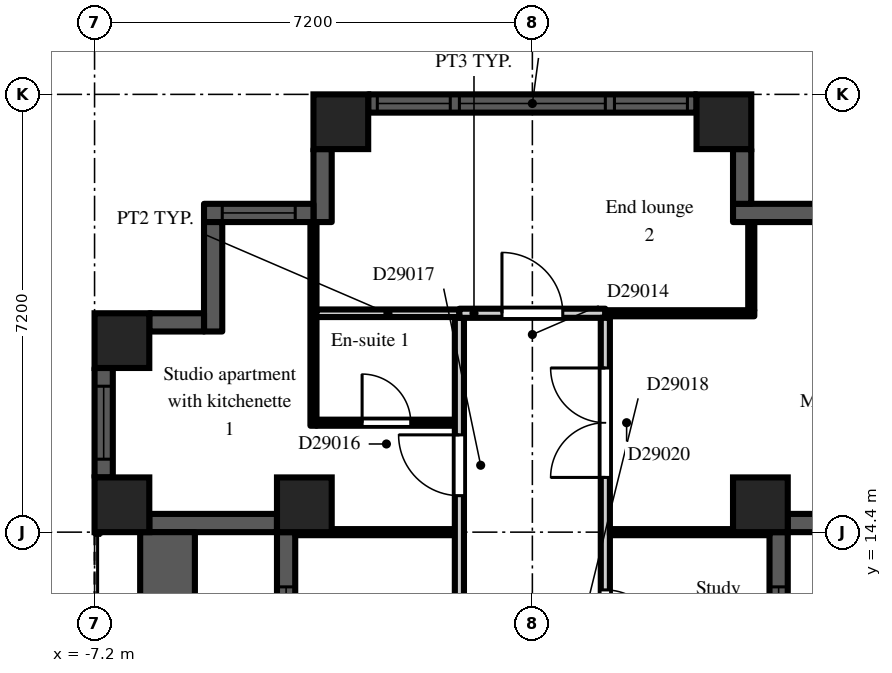
"""IFC4 building model, lengths in metres.
Left out: names, types, materials, properties, quantities, classifications, styles, units other than length and angle.
Written with IfcOpenShell. Run it as: python <this file> out.ifc"""

import sys

from ifc_helpers import new_model, si_unit, direction, frame, frame_2d, origin, origin_2d, place, context, subcontext, project, spatial, rectangle, extrude, element, fill, save


model = new_model("IFC4")
c1 = context("Model", 3, precision=1e-05, world=origin(), true_north=direction((0.0, 1.0)))
c2 = subcontext(c1, "Body", "Model", "MODEL_VIEW")
j1 = project(units=[si_unit("LENGTHUNIT", "METRE"), si_unit("PLANEANGLEUNIT", "RADIAN")], contexts=[c1])
p1 = place(None, origin())
s1 = spatial("IfcSite", under=j1, at=p1, CompositionType="ELEMENT")
p2 = place(p1, origin())
s2 = spatial("IfcBuilding", under=s1, at=p2, CompositionType="ELEMENT")
p3 = place(p2, frame((0.0, 0.0, 198.9)))
s3 = spatial("IfcBuildingStorey", under=s2, at=p3, CompositionType="ELEMENT", Elevation=198.9)
for number, where, z_axis, x_axis in (
    (1, (-6.75, 14.85, 0.0), (0.0, 0.0, 1.0), (1.0, 0.0, 0.0)),
    (2, (-6.75, 17.55, 0.0), (0.0, 0.0, 1.0), (1.0, 0.0, 0.0)),
    (3, (-3.75, 14.85, 0.0), (0.0, 0.0, 1.0), (1.0, 0.0, 0.0)),
    (4, (-3.15, 21.15, 0.0), (0.0, 0.0, 1.0), (1.0, 0.0, 0.0)),
    (5, (3.15, 21.15, 0.0), (0.0, 0.0, 1.0), (1.0, 0.0, 0.0)),
    (6, (3.75, 14.85, 0.0), (0.0, 0.0, 1.0), (1.0, 0.0, 0.0)),
):
    element("IfcColumn", number, at=place(p3, frame(where, z_axis=z_axis, x_axis=x_axis)), inside=s3, PredefinedType="COLUMN", context=c2, shape_type="SweptSolid", body=[
        extrude(rectangle(XDim=0.9, YDim=0.9, at=origin_2d()), origin(), (0.0, 0.0, 1.0), 3.0),
    ])
p4 = place(p3, frame((4.05, 7.2, 0.0), z_axis=(0.0, 0.0, 1.0), x_axis=(0.0, 1.0, 0.0)))
e7 = element("IfcWall", 7, at=p4, inside=s3, PredefinedType="SOLIDWALL", context=c2, shape_type="SweptSolid", body=[
    extrude(rectangle(XDim=7.2, YDim=0.3, at=frame_2d((3.6, 0.0))), origin(), (0.0, 0.0, 1.0), 2.3),
])
p5 = place(p4, frame((3.0, 0.0, 0.0)))
e8 = element("IfcOpeningElement", 8, at=p5, cuts=e7, PredefinedType="OPENING", context=c2, shape_type="SweptSolid", body=[
    extrude(rectangle(XDim=1.2, YDim=2.05, at=frame_2d((0.6, 1.025))), frame((0.0, 0.16, 0.0), z_axis=(0.0, -1.0, 0.0), x_axis=(1.0, 0.0, 0.0)), (0.0, 0.0, 1.0), 0.32),
])
p6 = place(p4, frame((0.9, 0.0, 0.2)))
e9 = element("IfcOpeningElement", 9, at=p6, cuts=e7, PredefinedType="OPENING", context=c2, shape_type="SweptSolid", body=[
    extrude(rectangle(XDim=1.8, YDim=1.85, at=frame_2d((0.9, 0.925))), frame((0.0, 0.16, 0.0), z_axis=(0.0, -1.0, 0.0), x_axis=(1.0, 0.0, 0.0)), (0.0, 0.0, 1.0), 0.32),
])
p7 = place(p4, frame((4.5, 0.0, 0.2)))
e10 = element("IfcOpeningElement", 10, at=p7, cuts=e7, PredefinedType="OPENING", context=c2, shape_type="SweptSolid", body=[
    extrude(rectangle(XDim=1.8, YDim=1.85, at=frame_2d((0.9, 0.925))), frame((0.0, 0.16, 0.0), z_axis=(0.0, -1.0, 0.0), x_axis=(1.0, 0.0, 0.0)), (0.0, 0.0, 1.0), 0.32),
])
p8 = place(p3, frame((4.2, 14.55, 0.0), z_axis=(0.0, 0.0, 1.0), x_axis=(1.0, 0.0, 0.0)))
e11 = element("IfcWall", 11, at=p8, inside=s3, PredefinedType="SOLIDWALL", context=c2, shape_type="SweptSolid", body=[
    extrude(rectangle(XDim=2.1, YDim=0.3, at=frame_2d((1.05, 0.0))), origin(), (0.0, 0.0, 1.0), 2.3),
])
p9 = place(p3, frame((5.1, 19.65, 0.0), z_axis=(0.0, 0.0, 1.0), x_axis=(-1.0, 0.0, 0.0)))
e12 = element("IfcWall", 12, at=p9, inside=s3, PredefinedType="SOLIDWALL", context=c2, shape_type="SweptSolid", body=[
    extrude(rectangle(XDim=1.8, YDim=0.3, at=frame_2d((0.9, 0.0))), origin(), (0.0, 0.0, 1.0), 2.6),
])
p10 = place(p3, frame((3.45, 19.8, 0.0), z_axis=(0.0, 0.0, 1.0), x_axis=(0.0, 1.0, 0.0)))
e13 = element("IfcWall", 13, at=p10, inside=s3, PredefinedType="SOLIDWALL", context=c2, shape_type="SweptSolid", body=[
    extrude(rectangle(XDim=0.9, YDim=0.3, at=frame_2d((0.45, 0.0))), origin(), (0.0, 0.0, 1.0), 2.6),
])
p11 = place(p3, frame((2.7, 21.45, 0.0), z_axis=(0.0, 0.0, 1.0), x_axis=(-1.0, 0.0, 0.0)))
e14 = element("IfcWall", 14, at=p11, inside=s3, PredefinedType="SOLIDWALL", context=c2, shape_type="SweptSolid", body=[
    extrude(rectangle(XDim=5.4, YDim=0.3, at=frame_2d((2.7, 0.0))), origin(), (0.0, 0.0, 1.0), 2.3),
])
p12 = place(p11, frame((1.5, 0.0, 0.2)))
e15 = element("IfcOpeningElement", 15, at=p12, cuts=e14, PredefinedType="OPENING", context=c2, shape_type="SweptSolid", body=[
    extrude(rectangle(XDim=2.4, YDim=1.85, at=frame_2d((1.2, 0.925))), frame((0.0, 0.16, 0.0), z_axis=(0.0, -1.0, 0.0), x_axis=(1.0, 0.0, 0.0)), (0.0, 0.0, 1.0), 0.32),
])
p13 = place(p11, frame((0.15, 0.0, 0.2)))
e16 = element("IfcOpeningElement", 16, at=p13, cuts=e14, PredefinedType="OPENING", context=c2, shape_type="SweptSolid", body=[
    extrude(rectangle(XDim=1.2, YDim=1.85, at=frame_2d((0.6, 0.925))), frame((0.0, 0.16, 0.0), z_axis=(0.0, -1.0, 0.0), x_axis=(1.0, 0.0, 0.0)), (0.0, 0.0, 1.0), 0.32),
])
p14 = place(p11, frame((4.05, 0.0, 0.2)))
e17 = element("IfcOpeningElement", 17, at=p14, cuts=e14, PredefinedType="OPENING", context=c2, shape_type="SweptSolid", body=[
    extrude(rectangle(XDim=1.2, YDim=1.85, at=frame_2d((0.6, 0.925))), frame((0.0, 0.16, 0.0), z_axis=(0.0, -1.0, 0.0), x_axis=(1.0, 0.0, 0.0)), (0.0, 0.0, 1.0), 0.32),
])
p15 = place(p3, frame((-3.45, 20.7, 0.0), z_axis=(0.0, 0.0, 1.0), x_axis=(0.0, -1.0, 0.0)))
e18 = element("IfcWall", 18, at=p15, inside=s3, PredefinedType="SOLIDWALL", context=c2, shape_type="SweptSolid", body=[
    extrude(rectangle(XDim=1.2, YDim=0.3, at=frame_2d((0.6, 0.0))), origin(), (0.0, 0.0, 1.0), 2.6),
])
p16 = place(p3, frame((-3.6, 19.65, 0.0), z_axis=(0.0, 0.0, 1.0), x_axis=(-1.0, 0.0, 0.0)))
e19 = element("IfcWall", 19, at=p16, inside=s3, PredefinedType="SOLIDWALL", context=c2, shape_type="SweptSolid", body=[
    extrude(rectangle(XDim=1.8, YDim=0.3, at=frame_2d((0.9, 0.0))), origin(), (0.0, 0.0, 1.0), 2.6),
])
p17 = place(p16, frame((0.3, 0.0, 0.2)))
e20 = element("IfcOpeningElement", 20, at=p17, cuts=e19, PredefinedType="OPENING", context=c2, shape_type="SweptSolid", body=[
    extrude(rectangle(XDim=1.2, YDim=1.85, at=frame_2d((0.6, 0.925))), frame((0.0, 0.16, 0.0), z_axis=(0.0, -1.0, 0.0), x_axis=(1.0, 0.0, 0.0)), (0.0, 0.0, 1.0), 0.32),
])
p18 = place(p3, frame((-5.25, 19.5, 0.0), z_axis=(0.0, 0.0, 1.0), x_axis=(0.0, -1.0, 0.0)))
e21 = element("IfcWall", 21, at=p18, inside=s3, PredefinedType="SOLIDWALL", context=c2, shape_type="SweptSolid", body=[
    extrude(rectangle(XDim=1.8, YDim=0.3, at=frame_2d((0.9, 0.0))), origin(), (0.0, 0.0, 1.0), 2.6),
])
p19 = place(p3, frame((-5.4, 17.85, 0.0), z_axis=(0.0, 0.0, 1.0), x_axis=(-1.0, 0.0, 0.0)))
e22 = element("IfcWall", 22, at=p19, inside=s3, PredefinedType="SOLIDWALL", context=c2, shape_type="SweptSolid", body=[
    extrude(rectangle(XDim=0.9, YDim=0.3, at=frame_2d((0.45, 0.0))), origin(), (0.0, 0.0, 1.0), 2.6),
])
p20 = place(p3, frame((-7.05, 17.1, 0.0), z_axis=(0.0, 0.0, 1.0), x_axis=(0.0, -1.0, 0.0)))
e23 = element("IfcWall", 23, at=p20, inside=s3, PredefinedType="SOLIDWALL", context=c2, shape_type="SweptSolid", body=[
    extrude(rectangle(XDim=1.8, YDim=0.3, at=frame_2d((0.9, 0.0))), origin(), (0.0, 0.0, 1.0), 2.3),
])
p21 = place(p20, frame((0.3, 0.0, 0.2)))
e24 = element("IfcOpeningElement", 24, at=p21, cuts=e23, PredefinedType="OPENING", context=c2, shape_type="SweptSolid", body=[
    extrude(rectangle(XDim=1.2, YDim=1.85, at=frame_2d((0.6, 0.925))), frame((0.0, 0.16, 0.0), z_axis=(0.0, -1.0, 0.0), x_axis=(1.0, 0.0, 0.0)), (0.0, 0.0, 1.0), 0.32),
])
p22 = place(p3, frame((-6.3, 14.55, 0.0), z_axis=(0.0, 0.0, 1.0), x_axis=(1.0, 0.0, 0.0)))
e25 = element("IfcWall", 25, at=p22, inside=s3, PredefinedType="SOLIDWALL", context=c2, shape_type="SweptSolid", body=[
    extrude(rectangle(XDim=2.1, YDim=0.3, at=frame_2d((1.05, 0.0))), origin(), (0.0, 0.0, 1.0), 2.3),
])
p23 = place(p3, frame((-4.05, 14.4, 0.0), z_axis=(0.0, 0.0, 1.0), x_axis=(0.0, -1.0, 0.0)))
e26 = element("IfcWall", 26, at=p23, inside=s3, PredefinedType="SOLIDWALL", context=c2, shape_type="SweptSolid", body=[
    extrude(rectangle(XDim=7.2, YDim=0.3, at=frame_2d((3.6, 0.0))), origin(), (0.0, 0.0, 1.0), 2.3),
])
p24 = place(p23, frame((3.0, 0.0, 0.0)))
e27 = element("IfcOpeningElement", 27, at=p24, cuts=e26, PredefinedType="OPENING", context=c2, shape_type="SweptSolid", body=[
    extrude(rectangle(XDim=1.2, YDim=2.05, at=frame_2d((0.6, 1.025))), frame((0.0, 0.16, 0.0), z_axis=(0.0, -1.0, 0.0), x_axis=(1.0, 0.0, 0.0)), (0.0, 0.0, 1.0), 0.32),
])
p25 = place(p23, frame((0.9, 0.0, 0.2)))
e28 = element("IfcOpeningElement", 28, at=p25, cuts=e26, PredefinedType="OPENING", context=c2, shape_type="SweptSolid", body=[
    extrude(rectangle(XDim=1.8, YDim=1.85, at=frame_2d((0.9, 0.925))), frame((0.0, 0.16, 0.0), z_axis=(0.0, -1.0, 0.0), x_axis=(1.0, 0.0, 0.0)), (0.0, 0.0, 1.0), 0.32),
])
p26 = place(p23, frame((4.5, 0.0, 0.2)))
e29 = element("IfcOpeningElement", 29, at=p26, cuts=e26, PredefinedType="OPENING", context=c2, shape_type="SweptSolid", body=[
    extrude(rectangle(XDim=1.8, YDim=1.85, at=frame_2d((0.9, 0.925))), frame((0.0, 0.16, 0.0), z_axis=(0.0, -1.0, 0.0), x_axis=(1.0, 0.0, 0.0)), (0.0, 0.0, 1.0), 0.32),
])
p27 = place(p3, frame((-6.0, 7.2, 0.0), z_axis=(0.0, 0.0, 1.0), x_axis=(0.0, 1.0, 0.0)))
e30 = element("IfcWall", 30, at=p27, inside=s3, PredefinedType="PARAPET", context=c2, shape_type="SweptSolid", body=[
    extrude(rectangle(XDim=7.2, YDim=0.9, at=frame_2d((3.6, 0.0))), origin(), (0.0, 0.0, 1.0), 0.8),
])
p28 = place(p3, frame((-3.9, 14.4, 0.0), z_axis=(0.0, 0.0, 1.0), x_axis=(1.0, 0.0, 0.0)))
e31 = element("IfcWall", 31, at=p28, inside=s3, PredefinedType="PARTITIONING", context=c2, shape_type="SweptSolid", body=[
    extrude(rectangle(XDim=2.625, YDim=0.1, at=frame_2d((1.312, 0.0))), origin(), (0.0, 0.0, 1.0), 2.6),
])
p29 = place(p3, frame((-3.6, 16.15, 0.0), z_axis=(0.0, 0.0, 1.0), x_axis=(0.0, 1.0, 0.0)))
e32 = element("IfcWall", 32, at=p29, inside=s3, PredefinedType="PARTITIONING", context=c2, shape_type="SweptSolid", body=[
    extrude(rectangle(XDim=3.35, YDim=0.1, at=frame_2d((1.675, 0.0))), origin(), (0.0, 0.0, 1.0), 2.6),
])
p30 = place(p3, frame((-3.55, 16.2, 0.0), z_axis=(0.0, 0.0, 1.0), x_axis=(1.0, 0.0, 0.0)))
e33 = element("IfcWall", 33, at=p30, inside=s3, PredefinedType="PARTITIONING", context=c2, shape_type="SweptSolid", body=[
    extrude(rectangle(XDim=2.275, YDim=0.1, at=frame_2d((1.138, 0.0))), origin(), (0.0, 0.0, 1.0), 2.6),
])
p31 = place(p30, frame((0.75, 0.0, 0.0)))
e34 = element("IfcOpeningElement", 34, at=p31, cuts=e33, PredefinedType="OPENING", context=c2, shape_type="SweptSolid", body=[
    extrude(rectangle(XDim=0.8, YDim=2.1, at=frame_2d((0.4, 1.05))), frame((0.0, 0.06, 0.0), z_axis=(0.0, -1.0, 0.0), x_axis=(1.0, 0.0, 0.0)), (0.0, 0.0, 1.0), 0.12),
])
p32 = place(p3, frame((-3.55, 18.0, 0.0), z_axis=(0.0, 0.0, 1.0), x_axis=(1.0, 0.0, 0.0)))
e35 = element("IfcWall", 35, at=p32, inside=s3, PredefinedType="PARTITIONING", context=c2, shape_type="SweptSolid", body=[
    extrude(rectangle(XDim=2.35, YDim=0.125, at=frame_2d((1.175, 0.0))), origin(), (0.0, 0.0, 1.0), 2.6),
])
p33 = place(p3, frame((-1.2, 1.275, 0.0), z_axis=(0.0, 0.0, 1.0), x_axis=(0.0, 1.0, 0.0)))
e36 = element("IfcWall", 36, at=p33, inside=s3, PredefinedType="PARTITIONING", context=c2, shape_type="SweptSolid", body=[
    extrude(rectangle(XDim=16.65, YDim=0.15, at=frame_2d((8.325, 0.0))), origin(), (0.0, 0.0, 1.0), 2.6),
])
p34 = place(p33, frame((2.475, 0.0, 0.0)))
e37 = element("IfcOpeningElement", 37, at=p34, cuts=e36, PredefinedType="OPENING", context=c2, shape_type="SweptSolid", body=[
    extrude(rectangle(XDim=0.9, YDim=2.1, at=frame_2d((0.45, 1.05))), frame((0.0, 0.085, 0.0), z_axis=(0.0, -1.0, 0.0), x_axis=(1.0, 0.0, 0.0)), (0.0, 0.0, 1.0), 0.17),
])
p35 = place(p33, frame((10.875, 0.0, 0.0)))
e38 = element("IfcOpeningElement", 38, at=p35, cuts=e36, PredefinedType="OPENING", context=c2, shape_type="SweptSolid", body=[
    extrude(rectangle(XDim=0.9, YDim=2.1, at=frame_2d((0.45, 1.05))), frame((0.0, 0.085, 0.0), z_axis=(0.0, -1.0, 0.0), x_axis=(1.0, 0.0, 0.0)), (0.0, 0.0, 1.0), 0.17),
])
p36 = place(p33, frame((13.725, 0.0, 0.0)))
e39 = element("IfcOpeningElement", 39, at=p36, cuts=e36, PredefinedType="OPENING", context=c2, shape_type="SweptSolid", body=[
    extrude(rectangle(XDim=1.0, YDim=2.1, at=frame_2d((0.5, 1.05))), frame((0.0, 0.085, 0.0), z_axis=(0.0, -1.0, 0.0), x_axis=(1.0, 0.0, 0.0)), (0.0, 0.0, 1.0), 0.17),
])
p37 = place(p3, frame((-1.2, 18.0, 0.0), z_axis=(0.0, 0.0, 1.0), x_axis=(1.0, 0.0, 0.0)))
e40 = element("IfcWall", 40, at=p37, inside=s3, PredefinedType="PARTITIONING", context=c2, shape_type="SweptSolid", body=[
    extrude(rectangle(XDim=2.4, YDim=0.15, at=frame_2d((1.2, 0.0))), origin(), (0.0, 0.0, 1.0), 2.6),
])
p38 = place(p37, frame((0.7, 0.0, 0.0)))
e41 = element("IfcOpeningElement", 41, at=p38, cuts=e40, PredefinedType="OPENING", context=c2, shape_type="SweptSolid", body=[
    extrude(rectangle(XDim=1.0, YDim=2.1, at=frame_2d((0.5, 1.05))), frame((0.0, 0.085, 0.0), z_axis=(0.0, -1.0, 0.0), x_axis=(1.0, 0.0, 0.0)), (0.0, 0.0, 1.0), 0.17),
])
p39 = place(p3, frame((1.2, 1.125, 0.0), z_axis=(0.0, 0.0, 1.0), x_axis=(0.0, 1.0, 0.0)))
e42 = element("IfcWall", 42, at=p39, inside=s3, PredefinedType="PARTITIONING", context=c2, shape_type="SweptSolid", body=[
    extrude(rectangle(XDim=16.8, YDim=0.15, at=frame_2d((8.4, 0.0))), origin(), (0.0, 0.0, 1.0), 2.6),
])
p40 = place(p39, frame((2.625, 0.0, 0.0)))
e43 = element("IfcOpeningElement", 43, at=p40, cuts=e42, PredefinedType="OPENING", context=c2, shape_type="SweptSolid", body=[
    extrude(rectangle(XDim=0.9, YDim=2.1, at=frame_2d((0.45, 1.05))), frame((0.0, 0.085, 0.0), z_axis=(0.0, -1.0, 0.0), x_axis=(1.0, 0.0, 0.0)), (0.0, 0.0, 1.0), 0.17),
])
p41 = place(p39, frame((11.425, 0.0, 0.0)))
e44 = element("IfcOpeningElement", 44, at=p41, cuts=e42, PredefinedType="OPENING", context=c2, shape_type="SweptSolid", body=[
    extrude(rectangle(XDim=0.9, YDim=2.1, at=frame_2d((0.45, 1.05))), frame((0.0, 0.085, 0.0), z_axis=(0.0, -1.0, 0.0), x_axis=(1.0, 0.0, 0.0)), (0.0, 0.0, 1.0), 0.17),
])
p42 = place(p39, frame((7.825, 0.0, 0.0)))
e45 = element("IfcOpeningElement", 45, at=p42, cuts=e42, PredefinedType="OPENING", context=c2, shape_type="SweptSolid", body=[
    extrude(rectangle(XDim=0.9, YDim=2.1, at=frame_2d((0.45, 1.05))), frame((0.0, 0.085, 0.0), z_axis=(0.0, -1.0, 0.0), x_axis=(1.0, 0.0, 0.0)), (0.0, 0.0, 1.0), 0.17),
])
p43 = place(p39, frame((14.175, 0.0, 0.0)))
e46 = element("IfcOpeningElement", 46, at=p43, cuts=e42, PredefinedType="OPENING", context=c2, shape_type="SweptSolid", body=[
    extrude(rectangle(XDim=1.8, YDim=2.1, at=frame_2d((0.9, 1.05))), frame((0.0, 0.085, 0.0), z_axis=(0.0, -1.0, 0.0), x_axis=(1.0, 0.0, 0.0)), (0.0, 0.0, 1.0), 0.17),
])
p44 = place(p3, frame((1.275, 14.4, 0.0), z_axis=(0.0, 0.0, 1.0), x_axis=(1.0, 0.0, 0.0)))
e47 = element("IfcWall", 47, at=p44, inside=s3, PredefinedType="PARTITIONING", context=c2, shape_type="SweptSolid", body=[
    extrude(rectangle(XDim=2.625, YDim=0.1, at=frame_2d((1.312, 0.0))), origin(), (0.0, 0.0, 1.0), 2.6),
])
p45 = place(p3, frame((1.2, 18.0, 0.0), z_axis=(0.0, 0.0, 1.0), x_axis=(1.0, 0.0, 0.0)))
e48 = element("IfcWall", 48, at=p45, inside=s3, PredefinedType="PARTITIONING", context=c2, shape_type="SweptSolid", body=[
    extrude(rectangle(XDim=2.45, YDim=0.1, at=frame_2d((1.225, 0.0))), origin(), (0.0, 0.0, 1.0), 2.6),
])
p46 = place(p3, frame((3.6, 18.05, 0.0), z_axis=(0.0, 0.0, 1.0), x_axis=(0.0, 1.0, 0.0)))
e49 = element("IfcWall", 49, at=p46, inside=s3, PredefinedType="PARTITIONING", context=c2, shape_type="SweptSolid", body=[
    extrude(rectangle(XDim=1.45, YDim=0.1, at=frame_2d((0.725, 0.0))), origin(), (0.0, 0.0, 1.0), 2.6),
])
p47 = place(p7, origin())
e50 = element("IfcWindow", 50, at=p47, inside=s3, PartitioningType="SINGLE_PANEL", PredefinedType="WINDOW", context=c2, shape_type="SweptSolid", body=[
    extrude(rectangle(XDim=1.8, YDim=1.85, at=frame_2d((0.9, 0.925))), frame((0.0, 0.03, 0.0), z_axis=(0.0, -1.0, 0.0), x_axis=(1.0, 0.0, 0.0)), (0.0, 0.0, 1.0), 0.06),
])
fill(e10, e50)
p48 = place(p12, origin())
e51 = element("IfcWindow", 51, at=p48, inside=s3, PartitioningType="SINGLE_PANEL", PredefinedType="WINDOW", context=c2, shape_type="SweptSolid", body=[
    extrude(rectangle(XDim=2.4, YDim=1.85, at=frame_2d((1.2, 0.925))), frame((0.0, 0.03, 0.0), z_axis=(0.0, -1.0, 0.0), x_axis=(1.0, 0.0, 0.0)), (0.0, 0.0, 1.0), 0.06),
])
fill(e15, e51)
p49 = place(p13, origin())
e52 = element("IfcWindow", 52, at=p49, inside=s3, PartitioningType="SINGLE_PANEL", PredefinedType="WINDOW", context=c2, shape_type="SweptSolid", body=[
    extrude(rectangle(XDim=1.2, YDim=1.85, at=frame_2d((0.6, 0.925))), frame((0.0, 0.03, 0.0), z_axis=(0.0, -1.0, 0.0), x_axis=(1.0, 0.0, 0.0)), (0.0, 0.0, 1.0), 0.06),
])
fill(e16, e52)
p50 = place(p14, origin())
e53 = element("IfcWindow", 53, at=p50, inside=s3, PartitioningType="SINGLE_PANEL", PredefinedType="WINDOW", context=c2, shape_type="SweptSolid", body=[
    extrude(rectangle(XDim=1.2, YDim=1.85, at=frame_2d((0.6, 0.925))), frame((0.0, 0.03, 0.0), z_axis=(0.0, -1.0, 0.0), x_axis=(1.0, 0.0, 0.0)), (0.0, 0.0, 1.0), 0.06),
])
fill(e17, e53)
p51 = place(p17, origin())
e54 = element("IfcWindow", 54, at=p51, inside=s3, PartitioningType="SINGLE_PANEL", PredefinedType="WINDOW", context=c2, shape_type="SweptSolid", body=[
    extrude(rectangle(XDim=1.2, YDim=1.85, at=frame_2d((0.6, 0.925))), frame((0.0, 0.03, 0.0), z_axis=(0.0, -1.0, 0.0), x_axis=(1.0, 0.0, 0.0)), (0.0, 0.0, 1.0), 0.06),
])
fill(e20, e54)
p52 = place(p21, origin())
e55 = element("IfcWindow", 55, at=p52, inside=s3, PartitioningType="SINGLE_PANEL", PredefinedType="WINDOW", context=c2, shape_type="SweptSolid", body=[
    extrude(rectangle(XDim=1.2, YDim=1.85, at=frame_2d((0.6, 0.925))), frame((0.0, 0.03, 0.0), z_axis=(0.0, -1.0, 0.0), x_axis=(1.0, 0.0, 0.0)), (0.0, 0.0, 1.0), 0.06),
])
fill(e24, e55)
p53 = place(p25, origin())
e56 = element("IfcWindow", 56, at=p53, inside=s3, PartitioningType="SINGLE_PANEL", PredefinedType="WINDOW", context=c2, shape_type="SweptSolid", body=[
    extrude(rectangle(XDim=1.8, YDim=1.85, at=frame_2d((0.9, 0.925))), frame((0.0, 0.03, 0.0), z_axis=(0.0, -1.0, 0.0), x_axis=(1.0, 0.0, 0.0)), (0.0, 0.0, 1.0), 0.06),
])
fill(e28, e56)
p54 = place(p38, origin())
e57 = element("IfcDoor", 57, at=p54, inside=s3, OperationType="SINGLE_SWING_LEFT", PredefinedType="DOOR", context=c2, shape_type="SweptSolid", body=[
    extrude(rectangle(XDim=1.0, YDim=2.1, at=frame_2d((0.5, 1.05))), frame((0.0, 0.025, 0.0), z_axis=(0.0, -1.0, 0.0), x_axis=(1.0, 0.0, 0.0)), (0.0, 0.0, 1.0), 0.05),
])
fill(e41, e57)
p55 = place(p31, origin())
e58 = element("IfcDoor", 58, at=p55, inside=s3, OperationType="SINGLE_SWING_LEFT", PredefinedType="DOOR", context=c2, shape_type="SweptSolid", body=[
    extrude(rectangle(XDim=0.8, YDim=2.1, at=frame_2d((0.4, 1.05))), frame((0.0, 0.025, 0.0), z_axis=(0.0, -1.0, 0.0), x_axis=(1.0, 0.0, 0.0)), (0.0, 0.0, 1.0), 0.05),
])
fill(e34, e58)
p56 = place(p36, origin())
e59 = element("IfcDoor", 59, at=p56, inside=s3, OperationType="SINGLE_SWING_RIGHT", PredefinedType="DOOR", context=c2, shape_type="SweptSolid", body=[
    extrude(rectangle(XDim=1.0, YDim=2.1, at=frame_2d((0.5, 1.05))), frame((0.0, 0.025, 0.0), z_axis=(0.0, -1.0, 0.0), x_axis=(1.0, 0.0, 0.0)), (0.0, 0.0, 1.0), 0.05),
])
fill(e39, e59)
p57 = place(p41, frame((0.9, 0.0, 0.0), z_axis=(0.0, 0.0, 1.0), x_axis=(-1.0, 0.0, 0.0)))
e60 = element("IfcDoor", 60, at=p57, inside=s3, OperationType="SINGLE_SWING_RIGHT", PredefinedType="DOOR", context=c2, shape_type="SweptSolid", body=[
    extrude(rectangle(XDim=0.9, YDim=2.1, at=frame_2d((0.45, 1.05))), frame((0.0, 0.025, 0.0), z_axis=(0.0, -1.0, 0.0), x_axis=(1.0, 0.0, 0.0)), (0.0, 0.0, 1.0), 0.05),
])
fill(e44, e60)
p58 = place(p43, origin())
e61 = element("IfcDoor", 61, at=p58, inside=s3, OperationType="DOUBLE_DOOR_DOUBLE_SWING", PredefinedType="DOOR", context=c2, shape_type="SweptSolid", body=[
    extrude(rectangle(XDim=1.8, YDim=2.1, at=frame_2d((0.9, 1.05))), frame((0.0, 0.025, 0.0), z_axis=(0.0, -1.0, 0.0), x_axis=(1.0, 0.0, 0.0)), (0.0, 0.0, 1.0), 0.05),
])
fill(e46, e61)
save(model, sys.argv[1])
